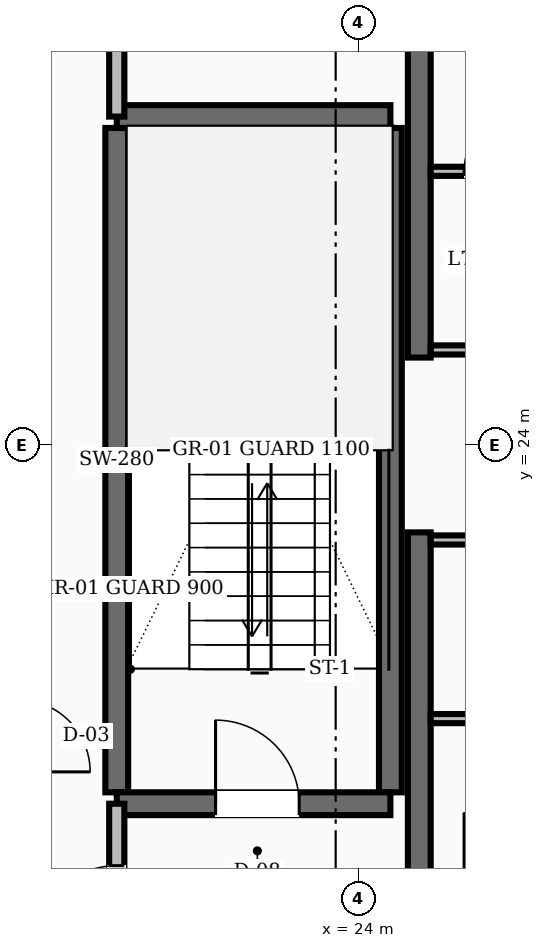
"""IFC4 building model, lengths in metres.
Left out: names, types, materials, properties, quantities, classifications, styles, units other than length and angle.
Written with IfcOpenShell. Run it as: python <this file> out.ifc"""

import sys

from ifc_helpers import new_model, si_unit, direction, frame, frame_2d, origin, place, context, subcontext, project, spatial, rectangle, extrude, element, fill, save


model = new_model("IFC4")
c1 = context("Model", 3, precision=1e-05, world=origin(), true_north=direction((0.0, 1.0)))
c2 = subcontext(c1, "Body", "Model", "MODEL_VIEW")
j1 = project(units=[si_unit("LENGTHUNIT", "METRE"), si_unit("PLANEANGLEUNIT", "RADIAN")], contexts=[c1])
p1 = place(None, origin())
s1 = spatial("IfcSite", under=j1, at=p1, CompositionType="ELEMENT")
p2 = place(p1, origin())
s2 = spatial("IfcBuilding", under=s1, at=p2, CompositionType="ELEMENT")
p3 = place(p2, frame((0.0, 0.0, 283.2)))
s3 = spatial("IfcBuildingStorey", under=s2, at=p3, CompositionType="ELEMENT", Elevation=283.2)
for number, where, z_axis, x_axis in (
    (1, (24.8, 16.55, 0.0), (0.0, 0.0, 1.0), (0.0, 1.0, 0.0)),
    (2, (24.8, 25.15, 0.0), (0.0, 0.0, 1.0), (0.0, 1.0, 0.0)),
):
    element("IfcWall", number, at=place(p3, frame(where, z_axis=z_axis, x_axis=x_axis)), inside=s3, PredefinedType="SHEAR", context=c2, shape_type="SweptSolid", body=[
        extrude(rectangle(XDim=6.3, YDim=0.3, at=frame_2d((3.15, 0.0))), origin(), (0.0, 0.0, 1.0), 3.6),
    ])
for number, where, z_axis, x_axis in (
    (3, (20.82, 19.43, 0.0), (0.0, 0.0, 1.0), (0.0, 1.0, 0.0)),
    (4, (24.42, 19.43, 0.0), (0.0, 0.0, 1.0), (0.0, 1.0, 0.0)),
):
    element("IfcWall", number, at=place(p3, frame(where, z_axis=z_axis, x_axis=x_axis)), inside=s3, PredefinedType="SHEAR", context=c2, shape_type="SweptSolid", body=[
        extrude(rectangle(XDim=8.74, YDim=0.3, at=frame_2d((4.37, 0.0))), origin(), (0.0, 0.0, 1.0), 3.6),
    ])
p4 = place(p3, frame((20.82, 19.28, 0.0), z_axis=(0.0, 0.0, 1.0), x_axis=(1.0, 0.0, 0.0)))
e5 = element("IfcWall", 5, at=p4, inside=s3, PredefinedType="SHEAR", context=c2, shape_type="SweptSolid", body=[
    extrude(rectangle(XDim=3.6, YDim=0.3, at=frame_2d((1.8, 0.0))), origin(), (0.0, 0.0, 1.0), 3.6),
])
p5 = place(p4, frame((1.3, 0.0, 0.0)))
e6 = element("IfcOpeningElement", 6, at=p5, cuts=e5, PredefinedType="OPENING", context=c2, shape_type="SweptSolid", body=[
    extrude(rectangle(XDim=1.1, YDim=2.1, at=frame_2d((0.55, 1.05))), frame((0.0, 0.16, 0.0), z_axis=(0.0, -1.0, 0.0), x_axis=(1.0, 0.0, 0.0)), (0.0, 0.0, 1.0), 0.32),
])
p6 = place(p3, frame((20.82, 28.32, 0.0), z_axis=(0.0, 0.0, 1.0), x_axis=(1.0, 0.0, 0.0)))
e7 = element("IfcWall", 7, at=p6, inside=s3, PredefinedType="SHEAR", context=c2, shape_type="SweptSolid", body=[
    extrude(rectangle(XDim=3.6, YDim=0.3, at=frame_2d((1.8, 0.0))), origin(), (0.0, 0.0, 1.0), 3.6),
])
p7 = place(p3, frame((20.82, 16.55, 0.0), z_axis=(0.0, 0.0, 1.0), x_axis=(0.0, 1.0, 0.0)))
e8 = element("IfcWall", 8, at=p7, inside=s3, PredefinedType="SOLIDWALL", context=c2, shape_type="SweptSolid", body=[
    extrude(rectangle(XDim=2.73, YDim=0.2, at=frame_2d((1.365, 0.0))), origin(), (0.0, 0.0, 1.0), 2.87),
])
p8 = place(p7, frame((0.815, 0.0, 0.0)))
e9 = element("IfcOpeningElement", 9, at=p8, cuts=e8, PredefinedType="OPENING", context=c2, shape_type="SweptSolid", body=[
    extrude(rectangle(XDim=1.1, YDim=2.1, at=frame_2d((0.55, 1.05))), frame((0.0, 0.11, 0.0), z_axis=(0.0, -1.0, 0.0), x_axis=(1.0, 0.0, 0.0)), (0.0, 0.0, 1.0), 0.22),
])
p9 = place(p3, frame((20.82, 28.32, 0.0), z_axis=(0.0, 0.0, 1.0), x_axis=(0.0, 1.0, 0.0)))
e10 = element("IfcWall", 10, at=p9, inside=s3, PredefinedType="SOLIDWALL", context=c2, shape_type="SweptSolid", body=[
    extrude(rectangle(XDim=3.13, YDim=0.2, at=frame_2d((1.565, 0.0))), origin(), (0.0, 0.0, 1.0), 2.87),
])
p10 = place(p9, frame((1.09, 0.0, 0.0)))
e11 = element("IfcOpeningElement", 11, at=p10, cuts=e10, PredefinedType="OPENING", context=c2, shape_type="SweptSolid", body=[
    extrude(rectangle(XDim=0.95, YDim=2.1, at=frame_2d((0.475, 1.05))), frame((0.0, 0.11, 0.0), z_axis=(0.0, -1.0, 0.0), x_axis=(1.0, 0.0, 0.0)), (0.0, 0.0, 1.0), 0.22),
])
p11 = place(p3, frame((24.95, 25.25, 0.0), z_axis=(0.0, 0.0, 1.0), x_axis=(1.0, 0.0, 0.0)))
e12 = element("IfcWall", 12, at=p11, inside=s3, PredefinedType="PARTITIONING", context=c2, shape_type="SweptSolid", body=[
    extrude(rectangle(XDim=3.2, YDim=0.12, at=frame_2d((1.6, 0.0))), origin(), (0.0, 0.0, 1.0), 2.87),
])
p12 = place(p11, frame((1.125, 0.0, 0.0)))
e13 = element("IfcOpeningElement", 13, at=p12, cuts=e12, PredefinedType="OPENING", context=c2, shape_type="SweptSolid", body=[
    extrude(rectangle(XDim=0.95, YDim=2.1, at=frame_2d((0.475, 1.05))), frame((0.0, 0.07, 0.0), z_axis=(0.0, -1.0, 0.0), x_axis=(1.0, 0.0, 0.0)), (0.0, 0.0, 1.0), 0.14),
])
p13 = place(p3, frame((24.95, 22.75, 0.0), z_axis=(0.0, 0.0, 1.0), x_axis=(1.0, 0.0, 0.0)))
e14 = element("IfcWall", 14, at=p13, inside=s3, PredefinedType="PARTITIONING", context=c2, shape_type="SweptSolid", body=[
    extrude(rectangle(XDim=3.2, YDim=0.12, at=frame_2d((1.6, 0.0))), origin(), (0.0, 0.0, 1.0), 2.87),
])
p14 = place(p13, frame((1.125, 0.0, 0.0)))
e15 = element("IfcOpeningElement", 15, at=p14, cuts=e14, PredefinedType="OPENING", context=c2, shape_type="SweptSolid", body=[
    extrude(rectangle(XDim=0.95, YDim=2.1, at=frame_2d((0.475, 1.05))), frame((0.0, 0.07, 0.0), z_axis=(0.0, -1.0, 0.0), x_axis=(1.0, 0.0, 0.0)), (0.0, 0.0, 1.0), 0.14),
])
p15 = place(p3, frame((24.95, 27.6, 0.0), z_axis=(0.0, 0.0, 1.0), x_axis=(1.0, 0.0, 0.0)))
e16 = element("IfcWall", 16, at=p15, inside=s3, PredefinedType="PARTITIONING", context=c2, shape_type="SweptSolid", body=[
    extrude(rectangle(XDim=3.2, YDim=0.12, at=frame_2d((1.6, 0.0))), origin(), (0.0, 0.0, 1.0), 2.87),
])
p16 = place(p15, frame((0.44, 0.0, 0.0)))
e17 = element("IfcOpeningElement", 17, at=p16, cuts=e16, PredefinedType="OPENING", context=c2, shape_type="SweptSolid", body=[
    extrude(rectangle(XDim=0.86, YDim=2.1, at=frame_2d((0.43, 1.05))), frame((0.0, 0.07, 0.0), z_axis=(0.0, -1.0, 0.0), x_axis=(1.0, 0.0, 0.0)), (0.0, 0.0, 1.0), 0.14),
])
p17 = place(p15, frame((1.9, 0.0, 0.0)))
e18 = element("IfcOpeningElement", 18, at=p17, cuts=e16, PredefinedType="OPENING", context=c2, shape_type="SweptSolid", body=[
    extrude(rectangle(XDim=0.86, YDim=2.1, at=frame_2d((0.43, 1.05))), frame((0.0, 0.07, 0.0), z_axis=(0.0, -1.0, 0.0), x_axis=(1.0, 0.0, 0.0)), (0.0, 0.0, 1.0), 0.14),
])
p18 = place(p3, frame((24.95, 20.4, 0.0), z_axis=(0.0, 0.0, 1.0), x_axis=(1.0, 0.0, 0.0)))
e19 = element("IfcWall", 19, at=p18, inside=s3, PredefinedType="PARTITIONING", context=c2, shape_type="SweptSolid", body=[
    extrude(rectangle(XDim=3.2, YDim=0.12, at=frame_2d((1.6, 0.0))), origin(), (0.0, 0.0, 1.0), 2.87),
])
p19 = place(p18, frame((1.125, 0.0, 0.0)))
e20 = element("IfcOpeningElement", 20, at=p19, cuts=e19, PredefinedType="OPENING", context=c2, shape_type="SweptSolid", body=[
    extrude(rectangle(XDim=0.95, YDim=2.1, at=frame_2d((0.475, 1.05))), frame((0.0, 0.07, 0.0), z_axis=(0.0, -1.0, 0.0), x_axis=(1.0, 0.0, 0.0)), (0.0, 0.0, 1.0), 0.14),
])
p20 = place(p5, origin())
e21 = element("IfcDoor", 21, at=p20, inside=s3, OperationType="SINGLE_SWING_LEFT", PredefinedType="DOOR", context=c2, shape_type="SweptSolid", body=[
    extrude(rectangle(XDim=1.1, YDim=2.1, at=frame_2d((0.55, 1.05))), frame((0.0, 0.025, 0.0), z_axis=(0.0, -1.0, 0.0), x_axis=(1.0, 0.0, 0.0)), (0.0, 0.0, 1.0), 0.05),
])
fill(e6, e21)
p21 = place(p8, origin())
e22 = element("IfcDoor", 22, at=p21, inside=s3, OperationType="SINGLE_SWING_LEFT", PredefinedType="DOOR", context=c2, shape_type="SweptSolid", body=[
    extrude(rectangle(XDim=1.1, YDim=2.1, at=frame_2d((0.55, 1.05))), frame((0.0, 0.025, 0.0), z_axis=(0.0, -1.0, 0.0), x_axis=(1.0, 0.0, 0.0)), (0.0, 0.0, 1.0), 0.05),
])
fill(e9, e22)
p22 = place(p16, origin())
e23 = element("IfcDoor", 23, at=p22, inside=s3, OperationType="SINGLE_SWING_RIGHT", PredefinedType="DOOR", context=c2, shape_type="SweptSolid", body=[
    extrude(rectangle(XDim=0.86, YDim=2.1, at=frame_2d((0.43, 1.05))), frame((0.0, 0.025, 0.0), z_axis=(0.0, -1.0, 0.0), x_axis=(1.0, 0.0, 0.0)), (0.0, 0.0, 1.0), 0.05),
])
fill(e17, e23)
save(model, sys.argv[1])
